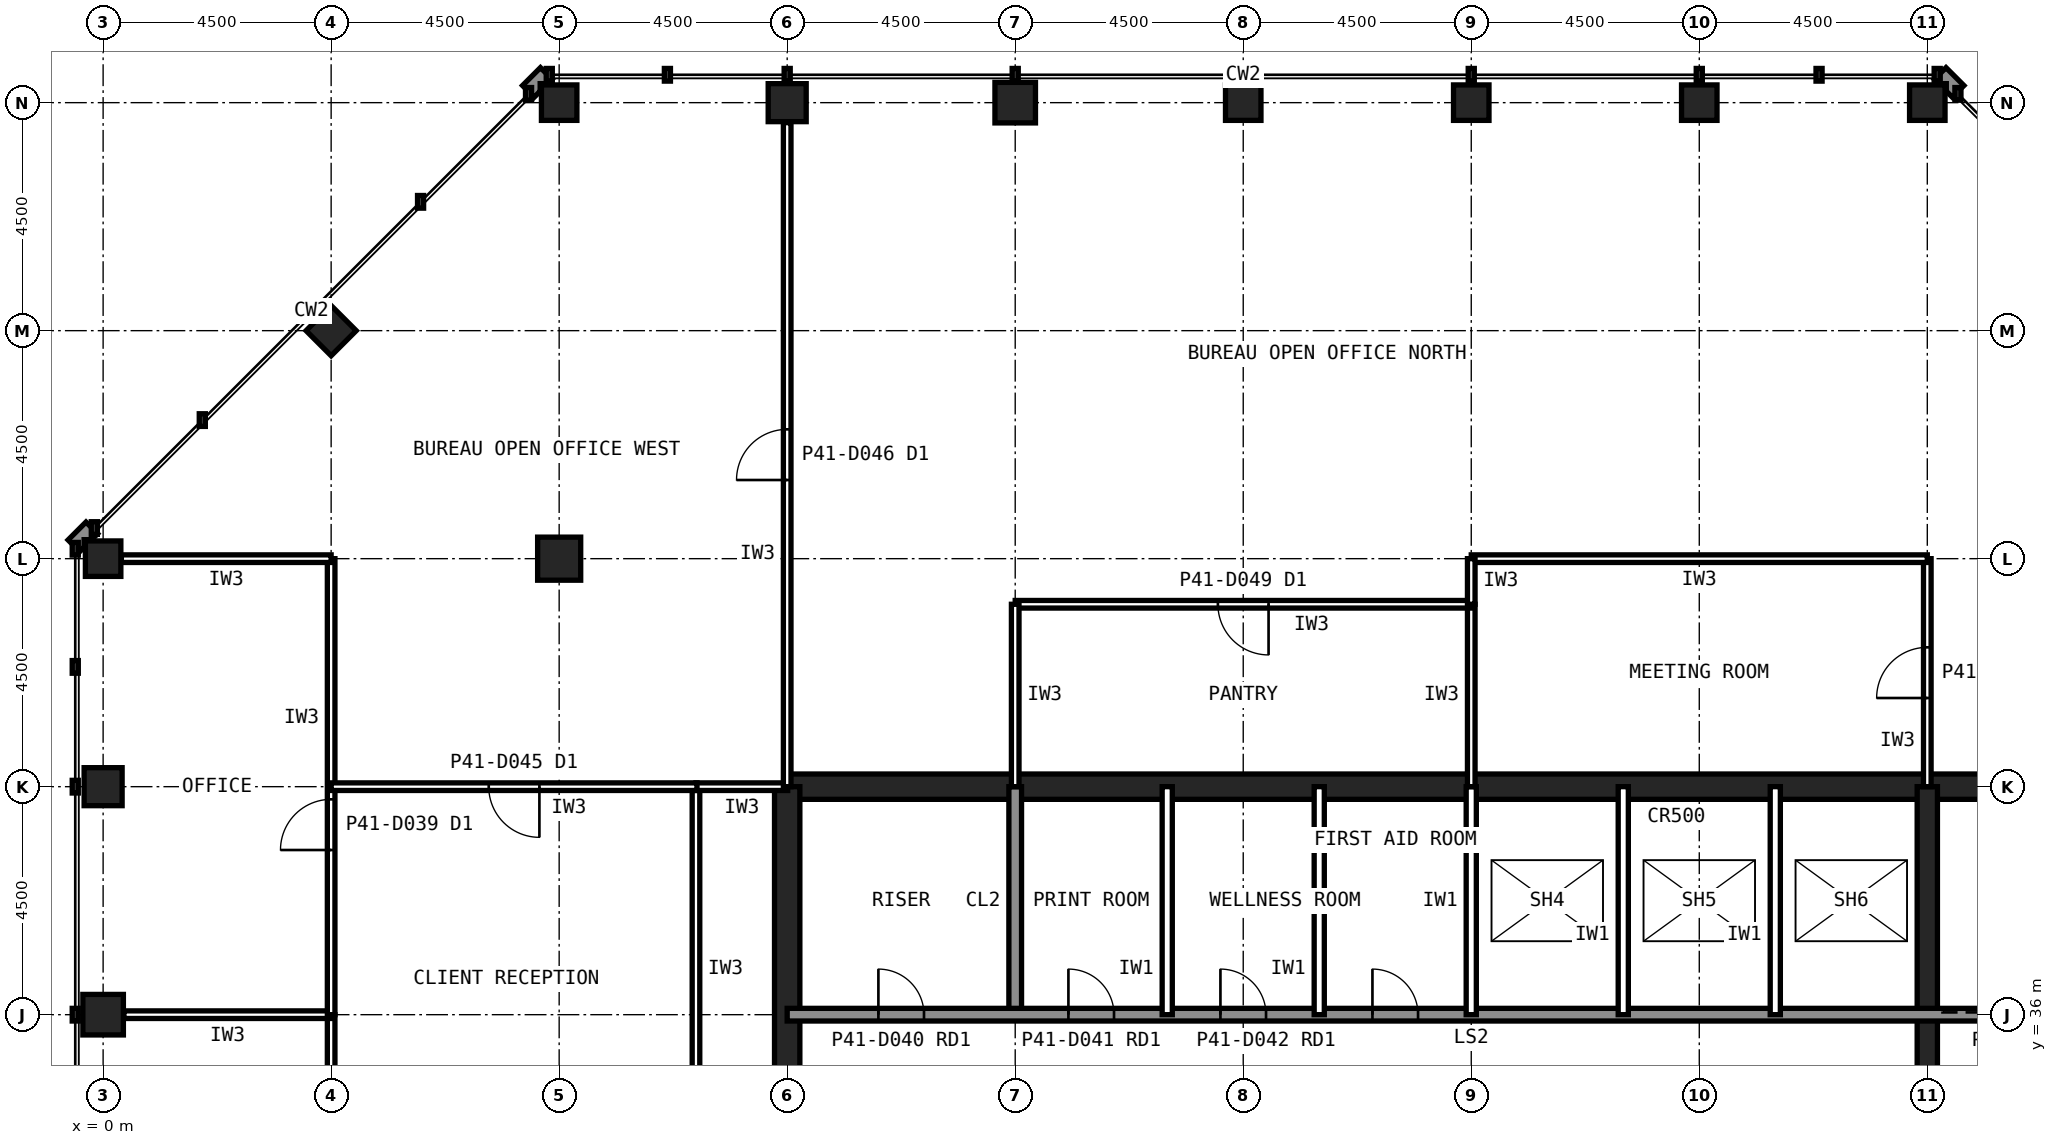
"""IFC4 building model, lengths in metres.
Left out: names, types, materials, properties, quantities, classifications, styles, units other than length and angle.
Written with IfcOpenShell. Run it as: python <this file> out.ifc"""

import sys

from ifc_helpers import new_model, si_unit, direction, frame, frame_2d, origin, origin_2d, place, context, subcontext, project, spatial, rectangle, hollow_rectangle, extrude, element, fill, save


model = new_model("IFC4")
c1 = context("Model", 3, precision=1e-05, world=origin(), true_north=direction((0.0, 1.0)))
c2 = subcontext(c1, "Body", "Model", "MODEL_VIEW")
j1 = project(units=[si_unit("LENGTHUNIT", "METRE"), si_unit("PLANEANGLEUNIT", "RADIAN")], contexts=[c1])
p1 = place(None, origin())
s1 = spatial("IfcSite", under=j1, at=p1, CompositionType="ELEMENT")
p2 = place(p1, origin())
s2 = spatial("IfcBuilding", under=s1, at=p2, CompositionType="ELEMENT")
p3 = place(p2, frame((0.0, 0.0, 175.6)))
s3 = spatial("IfcBuildingStorey", under=s2, at=p3, CompositionType="ELEMENT", Elevation=175.6)
for number, where, z_axis, x_axis in (
    (1, (36.0, 54.0, 0.0), (0.0, 0.0, 1.0), (1.0, 0.0, 0.0)),
    (2, (31.5, 54.0, 0.0), (0.0, 0.0, 1.0), (1.0, 0.0, 0.0)),
    (3, (27.0, 54.0, 0.0), (0.0, 0.0, 1.0), (1.0, 0.0, 0.0)),
    (4, (22.5, 54.0, 0.0), (0.0, 0.0, 1.0), (1.0, 0.0, 0.0)),
):
    element("IfcColumn", number, at=place(p3, frame(where, z_axis=z_axis, x_axis=x_axis)), inside=s3, PredefinedType="COLUMN", context=c2, shape_type="SweptSolid", body=[
        extrude(hollow_rectangle(XDim=0.7, YDim=0.7, WallThickness=0.036, at=origin_2d()), origin(), (0.0, 0.0, 1.0), 4.0),
    ])
p4 = place(p3, frame((18.0, 54.0, 0.0), z_axis=(0.0, 0.0, 1.0), x_axis=(1.0, 0.0, 0.0)))
e5 = element("IfcColumn", 5, at=p4, inside=s3, PredefinedType="COLUMN", context=c2, shape_type="SweptSolid", body=[
    extrude(hollow_rectangle(XDim=0.8, YDim=0.8, WallThickness=0.045, at=origin_2d()), origin(), (0.0, 0.0, 1.0), 4.0),
])
p5 = place(p3, frame((13.5, 54.0, 0.0), z_axis=(0.0, 0.0, 1.0), x_axis=(1.0, 0.0, 0.0)))
e6 = element("IfcColumn", 6, at=p5, inside=s3, PredefinedType="COLUMN", context=c2, shape_type="SweptSolid", body=[
    extrude(hollow_rectangle(XDim=0.75, YDim=0.75, WallThickness=0.04, at=origin_2d()), origin(), (0.0, 0.0, 1.0), 4.0),
])
for number, where, z_axis, x_axis in (
    (7, (9.0, 54.0, 0.0), (0.0, 0.0, 1.0), (1.0, 0.0, 0.0)),
    (8, (0.0, 45.0, 0.0), (0.0, 0.0, 1.0), (1.0, 0.0, 0.0)),
):
    element("IfcColumn", number, at=place(p3, frame(where, z_axis=z_axis, x_axis=x_axis)), inside=s3, PredefinedType="COLUMN", context=c2, shape_type="SweptSolid", body=[
        extrude(hollow_rectangle(XDim=0.7, YDim=0.7, WallThickness=0.036, at=origin_2d()), origin(), (0.0, 0.0, 1.0), 4.0),
    ])
p6 = place(p3, frame((0.0, 40.5, 0.0), z_axis=(0.0, 0.0, 1.0), x_axis=(1.0, 0.0, 0.0)))
e9 = element("IfcColumn", 9, at=p6, inside=s3, PredefinedType="COLUMN", context=c2, shape_type="SweptSolid", body=[
    extrude(hollow_rectangle(XDim=0.75, YDim=0.75, WallThickness=0.04, at=origin_2d()), origin(), (0.0, 0.0, 1.0), 4.0),
])
p7 = place(p3, frame((0.0, 36.0, 0.0), z_axis=(0.0, 0.0, 1.0), x_axis=(1.0, 0.0, 0.0)))
e10 = element("IfcColumn", 10, at=p7, inside=s3, PredefinedType="COLUMN", context=c2, shape_type="SweptSolid", body=[
    extrude(hollow_rectangle(XDim=0.8, YDim=0.8, WallThickness=0.045, at=origin_2d()), origin(), (0.0, 0.0, 1.0), 4.0),
])
p8 = place(p3, frame((4.5, 49.5, 0.0), z_axis=(0.0, 0.0, 1.0), x_axis=(0.707106781187, 0.707106781187, 0.0)))
e11 = element("IfcColumn", 11, at=p8, inside=s3, PredefinedType="COLUMN", context=c2, shape_type="SweptSolid", body=[
    extrude(hollow_rectangle(XDim=0.7, YDim=0.7, WallThickness=0.036, at=origin_2d()), origin(), (0.0, 0.0, 1.0), 4.0),
])
p9 = place(p3, frame((9.0, 45.0, 0.0), z_axis=(0.0, 0.0, 1.0), x_axis=(1.0, 0.0, 0.0)))
e12 = element("IfcColumn", 12, at=p9, inside=s3, PredefinedType="COLUMN", context=c2, shape_type="SweptSolid", body=[
    extrude(hollow_rectangle(XDim=0.85, YDim=0.85, WallThickness=0.05, at=origin_2d()), origin(), (0.0, 0.0, 1.0), 4.0),
])
p10 = place(p3, frame((40.5, 40.5, 0.0), z_axis=(0.0, 0.0, 1.0), x_axis=(-1.0, 0.0, 0.0)))
e13 = element("IfcWall", 13, at=p10, inside=s3, PredefinedType="SHEAR", context=c2, shape_type="SweptSolid", body=[
    extrude(rectangle(XDim=27.0, YDim=0.5, at=frame_2d((13.5, 0.0))), origin(), (0.0, 0.0, 1.0), 4.0),
])
p11 = place(p3, frame((13.5, 40.5, 0.0), z_axis=(0.0, 0.0, 1.0), x_axis=(0.0, -1.0, 0.0)))
e14 = element("IfcWall", 14, at=p11, inside=s3, PredefinedType="SHEAR", context=c2, shape_type="SweptSolid", body=[
    extrude(rectangle(XDim=27.0, YDim=0.5, at=frame_2d((13.5, 0.0))), origin(), (0.0, 0.0, 1.0), 4.0),
])
p12 = place(p11, frame((19.65, 0.0, 0.0)))
e15 = element("IfcOpeningElement", 15, at=p12, cuts=e14, PredefinedType="OPENING", context=c2, shape_type="SweptSolid", body=[
    extrude(rectangle(XDim=1.2, YDim=2.1, at=frame_2d((0.6, 1.05))), frame((0.0, 0.26, 0.0), z_axis=(0.0, -1.0, 0.0), x_axis=(1.0, 0.0, 0.0)), (0.0, 0.0, 1.0), 0.52),
])
p13 = place(p11, frame((5.85, 0.0, 0.0)))
e16 = element("IfcOpeningElement", 16, at=p13, cuts=e14, PredefinedType="OPENING", context=c2, shape_type="SweptSolid", body=[
    extrude(rectangle(XDim=1.8, YDim=2.1, at=frame_2d((0.9, 1.05))), frame((0.0, 0.26, 0.0), z_axis=(0.0, -1.0, 0.0), x_axis=(1.0, 0.0, 0.0)), (0.0, 0.0, 1.0), 0.52),
])
p14 = place(p3, frame((18.0, 36.0, 0.0), z_axis=(0.0, 0.0, 1.0), x_axis=(0.0, 1.0, 0.0)))
e17 = element("IfcWall", 17, at=p14, inside=s3, PredefinedType="SOLIDWALL", context=c2, shape_type="SweptSolid", body=[
    extrude(rectangle(XDim=4.5, YDim=0.25, at=frame_2d((2.25, 0.0))), origin(), (0.0, 0.0, 1.0), 3.84),
])
p15 = place(p3, frame((36.0, 22.5, 0.0), z_axis=(0.0, 0.0, 1.0), x_axis=(0.0, 1.0, 0.0)))
e18 = element("IfcWall", 18, at=p15, inside=s3, PredefinedType="SHEAR", context=c2, shape_type="SweptSolid", body=[
    extrude(rectangle(XDim=18.0, YDim=0.4, at=frame_2d((9.0, 0.0))), origin(), (0.0, 0.0, 1.0), 4.0),
])
p16 = place(p3, frame((13.5, 36.0, 0.0), z_axis=(0.0, 0.0, 1.0), x_axis=(1.0, 0.0, 0.0)))
e19 = element("IfcWall", 19, at=p16, inside=s3, PredefinedType="SOLIDWALL", context=c2, shape_type="SweptSolid", body=[
    extrude(rectangle(XDim=27.0, YDim=0.25, at=frame_2d((13.5, 0.0))), origin(), (0.0, 0.0, 1.0), 3.84),
])
p17 = place(p16, frame((1.8, 0.0, 0.0)))
e20 = element("IfcOpeningElement", 20, at=p17, cuts=e19, PredefinedType="OPENING", context=c2, shape_type="SweptSolid", body=[
    extrude(rectangle(XDim=0.9, YDim=2.1, at=frame_2d((0.45, 1.05))), frame((0.0, 0.135, 0.0), z_axis=(0.0, -1.0, 0.0), x_axis=(1.0, 0.0, 0.0)), (0.0, 0.0, 1.0), 0.27),
])
p18 = place(p16, frame((5.55, 0.0, 0.0)))
e21 = element("IfcOpeningElement", 21, at=p18, cuts=e19, PredefinedType="OPENING", context=c2, shape_type="SweptSolid", body=[
    extrude(rectangle(XDim=0.9, YDim=2.1, at=frame_2d((0.45, 1.05))), frame((0.0, 0.135, 0.0), z_axis=(0.0, -1.0, 0.0), x_axis=(1.0, 0.0, 0.0)), (0.0, 0.0, 1.0), 0.27),
])
p19 = place(p16, frame((8.55, 0.0, 0.0)))
e22 = element("IfcOpeningElement", 22, at=p19, cuts=e19, PredefinedType="OPENING", context=c2, shape_type="SweptSolid", body=[
    extrude(rectangle(XDim=0.9, YDim=2.1, at=frame_2d((0.45, 1.05))), frame((0.0, 0.135, 0.0), z_axis=(0.0, -1.0, 0.0), x_axis=(1.0, 0.0, 0.0)), (0.0, 0.0, 1.0), 0.27),
])
p20 = place(p16, frame((11.55, 0.0, 0.0)))
e23 = element("IfcOpeningElement", 23, at=p20, cuts=e19, PredefinedType="OPENING", context=c2, shape_type="SweptSolid", body=[
    extrude(rectangle(XDim=0.9, YDim=2.1, at=frame_2d((0.45, 1.05))), frame((0.0, 0.135, 0.0), z_axis=(0.0, -1.0, 0.0), x_axis=(1.0, 0.0, 0.0)), (0.0, 0.0, 1.0), 0.27),
])
p21 = place(p16, frame((24.1, 0.0, 0.0)))
e24 = element("IfcOpeningElement", 24, at=p21, cuts=e19, PredefinedType="OPENING", context=c2, shape_type="SweptSolid", body=[
    extrude(rectangle(XDim=1.3, YDim=2.2, at=frame_2d((0.65, 1.1))), frame((0.0, 0.135, 0.0), z_axis=(0.0, -1.0, 0.0), x_axis=(1.0, 0.0, 0.0)), (0.0, 0.0, 1.0), 0.27),
])
for number, where, z_axis, x_axis in (
    (25, (21.0, 36.0, 0.0), (0.0, 0.0, 1.0), (0.0, 1.0, 0.0)),
    (26, (24.0, 36.0, 0.0), (0.0, 0.0, 1.0), (0.0, 1.0, 0.0)),
    (27, (27.0, 36.0, 0.0), (0.0, 0.0, 1.0), (0.0, 1.0, 0.0)),
    (28, (30.0, 36.0, 0.0), (0.0, 0.0, 1.0), (0.0, 1.0, 0.0)),
    (29, (33.0, 36.0, 0.0), (0.0, 0.0, 1.0), (0.0, 1.0, 0.0)),
):
    element("IfcWall", number, at=place(p3, frame(where, z_axis=z_axis, x_axis=x_axis)), inside=s3, PredefinedType="PARTITIONING", context=c2, shape_type="SweptSolid", body=[
        extrude(rectangle(XDim=4.5, YDim=0.2, at=frame_2d((2.25, 0.0))), origin(), (0.0, 0.0, 1.0), 3.84),
    ])
p22 = place(p3, frame((11.7, 40.5, 0.0), z_axis=(0.0, 0.0, 1.0), x_axis=(0.0, -1.0, 0.0)))
e30 = element("IfcWall", 30, at=p22, inside=s3, PredefinedType="PARTITIONING", context=c2, shape_type="SweptSolid", body=[
    extrude(rectangle(XDim=7.2, YDim=0.15, at=frame_2d((3.6, 0.0))), origin(), (0.0, 0.0, 1.0), 3.84),
])
p23 = place(p3, frame((13.51, 40.5, 0.0), z_axis=(0.0, 0.0, 1.0), x_axis=(-1.0, 0.0, 0.0)))
e31 = element("IfcWall", 31, at=p23, inside=s3, PredefinedType="PARTITIONING", context=c2, shape_type="SweptSolid", body=[
    extrude(rectangle(XDim=1.81, YDim=0.15, at=frame_2d((0.905, 0.0))), origin(), (0.0, 0.0, 1.0), 2.989),
])
p24 = place(p3, frame((4.5, 27.0, 0.0), z_axis=(0.0, 0.0, 1.0), x_axis=(0.0, 1.0, 0.0)))
e32 = element("IfcWall", 32, at=p24, inside=s3, PredefinedType="PARTITIONING", context=c2, shape_type="SweptSolid", body=[
    extrude(rectangle(XDim=9.0, YDim=0.15, at=frame_2d((4.5, 0.0))), origin(), (0.0, 0.0, 1.0), 3.84),
])
p25 = place(p24, frame((4.0, 0.0, 0.0)))
e33 = element("IfcOpeningElement", 33, at=p25, cuts=e32, PredefinedType="OPENING", context=c2, shape_type="SweptSolid", body=[
    extrude(rectangle(XDim=1.0, YDim=2.1, at=frame_2d((0.5, 1.05))), frame((0.0, 0.085, 0.0), z_axis=(0.0, -1.0, 0.0), x_axis=(1.0, 0.0, 0.0)), (0.0, 0.0, 1.0), 0.17),
])
p26 = place(p3, frame((4.5, 36.0, 0.0), z_axis=(0.0, 0.0, 1.0), x_axis=(-1.0, 0.0, 0.0)))
e34 = element("IfcWall", 34, at=p26, inside=s3, PredefinedType="PARTITIONING", context=c2, shape_type="SweptSolid", body=[
    extrude(rectangle(XDim=4.09, YDim=0.15, at=frame_2d((2.045, 0.0))), origin(), (0.0, 0.0, 1.0), 2.989),
])
p27 = place(p3, frame((4.5, 36.0, 0.0), z_axis=(0.0, 0.0, 1.0), x_axis=(0.0, 1.0, 0.0)))
e35 = element("IfcWall", 35, at=p27, inside=s3, PredefinedType="PARTITIONING", context=c2, shape_type="SweptSolid", body=[
    extrude(rectangle(XDim=9.0, YDim=0.15, at=frame_2d((4.5, 0.0))), origin(), (0.0, 0.0, 1.0), 3.84),
])
p28 = place(p27, frame((3.25, 0.0, 0.0)))
e36 = element("IfcOpeningElement", 36, at=p28, cuts=e35, PredefinedType="OPENING", context=c2, shape_type="SweptSolid", body=[
    extrude(rectangle(XDim=1.0, YDim=2.1, at=frame_2d((0.5, 1.05))), frame((0.0, 0.085, 0.0), z_axis=(0.0, -1.0, 0.0), x_axis=(1.0, 0.0, 0.0)), (0.0, 0.0, 1.0), 0.17),
])
p29 = place(p3, frame((4.5, 45.0, 0.0), z_axis=(0.0, 0.0, 1.0), x_axis=(-1.0, 0.0, 0.0)))
e37 = element("IfcWall", 37, at=p29, inside=s3, PredefinedType="PARTITIONING", context=c2, shape_type="SweptSolid", body=[
    extrude(rectangle(XDim=4.14, YDim=0.15, at=frame_2d((2.07, 0.0))), origin(), (0.0, 0.0, 1.0), 3.229),
])
p30 = place(p3, frame((27.0, 40.5, 0.0), z_axis=(0.0, 0.0, 1.0), x_axis=(0.0, 1.0, 0.0)))
e38 = element("IfcWall", 38, at=p30, inside=s3, PredefinedType="PARTITIONING", context=c2, shape_type="SweptSolid", body=[
    extrude(rectangle(XDim=3.6, YDim=0.15, at=frame_2d((1.8, 0.0))), origin(), (0.0, 0.0, 1.0), 2.989),
])
p31 = place(p3, frame((27.0, 44.1, 0.0), z_axis=(0.0, 0.0, 1.0), x_axis=(-1.0, 0.0, 0.0)))
e39 = element("IfcWall", 39, at=p31, inside=s3, PredefinedType="PARTITIONING", context=c2, shape_type="SweptSolid", body=[
    extrude(rectangle(XDim=9.0, YDim=0.15, at=frame_2d((4.5, 0.0))), origin(), (0.0, 0.0, 1.0), 3.84),
])
p32 = place(p31, frame((4.0, 0.0, 0.0)))
e40 = element("IfcOpeningElement", 40, at=p32, cuts=e39, PredefinedType="OPENING", context=c2, shape_type="SweptSolid", body=[
    extrude(rectangle(XDim=1.0, YDim=2.1, at=frame_2d((0.5, 1.05))), frame((0.0, 0.085, 0.0), z_axis=(0.0, -1.0, 0.0), x_axis=(1.0, 0.0, 0.0)), (0.0, 0.0, 1.0), 0.17),
])
p33 = place(p3, frame((18.0, 44.1, 0.0), z_axis=(0.0, 0.0, 1.0), x_axis=(0.0, -1.0, 0.0)))
e41 = element("IfcWall", 41, at=p33, inside=s3, PredefinedType="PARTITIONING", context=c2, shape_type="SweptSolid", body=[
    extrude(rectangle(XDim=3.6, YDim=0.15, at=frame_2d((1.8, 0.0))), origin(), (0.0, 0.0, 1.0), 2.989),
])
p34 = place(p3, frame((36.0, 40.5, 0.0), z_axis=(0.0, 0.0, 1.0), x_axis=(0.0, 1.0, 0.0)))
e42 = element("IfcWall", 42, at=p34, inside=s3, PredefinedType="PARTITIONING", context=c2, shape_type="SweptSolid", body=[
    extrude(rectangle(XDim=4.5, YDim=0.15, at=frame_2d((2.25, 0.0))), origin(), (0.0, 0.0, 1.0), 2.989),
])
p35 = place(p34, frame((1.75, 0.0, 0.0)))
e43 = element("IfcOpeningElement", 43, at=p35, cuts=e42, PredefinedType="OPENING", context=c2, shape_type="SweptSolid", body=[
    extrude(rectangle(XDim=1.0, YDim=2.1, at=frame_2d((0.5, 1.05))), frame((0.0, 0.085, 0.0), z_axis=(0.0, -1.0, 0.0), x_axis=(1.0, 0.0, 0.0)), (0.0, 0.0, 1.0), 0.17),
])
p36 = place(p3, frame((36.0, 45.0, 0.0), z_axis=(0.0, 0.0, 1.0), x_axis=(-1.0, 0.0, 0.0)))
e44 = element("IfcWall", 44, at=p36, inside=s3, PredefinedType="PARTITIONING", context=c2, shape_type="SweptSolid", body=[
    extrude(rectangle(XDim=9.0, YDim=0.15, at=frame_2d((4.5, 0.0))), origin(), (0.0, 0.0, 1.0), 3.84),
])
p37 = place(p3, frame((27.0, 45.0, 0.0), z_axis=(0.0, 0.0, 1.0), x_axis=(0.0, -1.0, 0.0)))
e45 = element("IfcWall", 45, at=p37, inside=s3, PredefinedType="PARTITIONING", context=c2, shape_type="SweptSolid", body=[
    extrude(rectangle(XDim=0.9, YDim=0.15, at=frame_2d((0.45, 0.0))), origin(), (0.0, 0.0, 1.0), 2.989),
])
p38 = place(p3, frame((13.5, 40.5, 0.0), z_axis=(0.0, 0.0, 1.0), x_axis=(0.0, 1.0, 0.0)))
e46 = element("IfcWall", 46, at=p38, inside=s3, PredefinedType="PARTITIONING", context=c2, shape_type="SweptSolid", body=[
    extrude(rectangle(XDim=13.105, YDim=0.15, at=frame_2d((6.552, 0.0))), origin(), (0.0, 0.0, 1.0), 2.989),
])
p39 = place(p38, frame((6.052, 0.0, 0.0)))
e47 = element("IfcOpeningElement", 47, at=p39, cuts=e46, PredefinedType="OPENING", context=c2, shape_type="SweptSolid", body=[
    extrude(rectangle(XDim=1.0, YDim=2.1, at=frame_2d((0.5, 1.05))), frame((0.0, 0.085, 0.0), z_axis=(0.0, -1.0, 0.0), x_axis=(1.0, 0.0, 0.0)), (0.0, 0.0, 1.0), 0.17),
])
p40 = place(p3, frame((11.72, 40.5, 0.0), z_axis=(0.0, 0.0, 1.0), x_axis=(-1.0, 0.0, 0.0)))
e48 = element("IfcWall", 48, at=p40, inside=s3, PredefinedType="PARTITIONING", context=c2, shape_type="SweptSolid", body=[
    extrude(rectangle(XDim=7.22, YDim=0.15, at=frame_2d((3.61, 0.0))), origin(), (0.0, 0.0, 1.0), 2.989),
])
p41 = place(p40, frame((3.11, 0.0, 0.0)))
e49 = element("IfcOpeningElement", 49, at=p41, cuts=e48, PredefinedType="OPENING", context=c2, shape_type="SweptSolid", body=[
    extrude(rectangle(XDim=1.0, YDim=2.1, at=frame_2d((0.5, 1.05))), frame((0.0, 0.085, 0.0), z_axis=(0.0, -1.0, 0.0), x_axis=(1.0, 0.0, 0.0)), (0.0, 0.0, 1.0), 0.17),
])
p42 = place(p17, origin())
e50 = element("IfcDoor", 50, at=p42, inside=s3, OperationType="SINGLE_SWING_LEFT", PredefinedType="DOOR", context=c2, shape_type="SweptSolid", body=[
    extrude(rectangle(XDim=0.9, YDim=2.1, at=frame_2d((0.45, 1.05))), frame((0.0, 0.025, 0.0), z_axis=(0.0, -1.0, 0.0), x_axis=(1.0, 0.0, 0.0)), (0.0, 0.0, 1.0), 0.05),
])
fill(e20, e50)
p43 = place(p18, origin())
e51 = element("IfcDoor", 51, at=p43, inside=s3, OperationType="SINGLE_SWING_LEFT", PredefinedType="DOOR", context=c2, shape_type="SweptSolid", body=[
    extrude(rectangle(XDim=0.9, YDim=2.1, at=frame_2d((0.45, 1.05))), frame((0.0, 0.025, 0.0), z_axis=(0.0, -1.0, 0.0), x_axis=(1.0, 0.0, 0.0)), (0.0, 0.0, 1.0), 0.05),
])
fill(e21, e51)
p44 = place(p19, origin())
e52 = element("IfcDoor", 52, at=p44, inside=s3, OperationType="SINGLE_SWING_LEFT", PredefinedType="DOOR", context=c2, shape_type="SweptSolid", body=[
    extrude(rectangle(XDim=0.9, YDim=2.1, at=frame_2d((0.45, 1.05))), frame((0.0, 0.025, 0.0), z_axis=(0.0, -1.0, 0.0), x_axis=(1.0, 0.0, 0.0)), (0.0, 0.0, 1.0), 0.05),
])
fill(e22, e52)
p45 = place(p20, origin())
e53 = element("IfcDoor", 53, at=p45, inside=s3, OperationType="SINGLE_SWING_LEFT", PredefinedType="DOOR", context=c2, shape_type="SweptSolid", body=[
    extrude(rectangle(XDim=0.9, YDim=2.1, at=frame_2d((0.45, 1.05))), frame((0.0, 0.025, 0.0), z_axis=(0.0, -1.0, 0.0), x_axis=(1.0, 0.0, 0.0)), (0.0, 0.0, 1.0), 0.05),
])
fill(e23, e53)
p46 = place(p28, origin())
e54 = element("IfcDoor", 54, at=p46, inside=s3, OperationType="SINGLE_SWING_LEFT", PredefinedType="DOOR", context=c2, shape_type="SweptSolid", body=[
    extrude(rectangle(XDim=1.0, YDim=2.1, at=frame_2d((0.5, 1.05))), frame((0.0, 0.025, 0.0), z_axis=(0.0, -1.0, 0.0), x_axis=(1.0, 0.0, 0.0)), (0.0, 0.0, 1.0), 0.05),
])
fill(e36, e54)
p47 = place(p32, origin())
e55 = element("IfcDoor", 55, at=p47, inside=s3, OperationType="SINGLE_SWING_LEFT", PredefinedType="DOOR", context=c2, shape_type="SweptSolid", body=[
    extrude(rectangle(XDim=1.0, YDim=2.1, at=frame_2d((0.5, 1.05))), frame((0.0, 0.025, 0.0), z_axis=(0.0, -1.0, 0.0), x_axis=(1.0, 0.0, 0.0)), (0.0, 0.0, 1.0), 0.05),
])
fill(e40, e55)
p48 = place(p35, origin())
e56 = element("IfcDoor", 56, at=p48, inside=s3, OperationType="SINGLE_SWING_LEFT", PredefinedType="DOOR", context=c2, shape_type="SweptSolid", body=[
    extrude(rectangle(XDim=1.0, YDim=2.1, at=frame_2d((0.5, 1.05))), frame((0.0, 0.025, 0.0), z_axis=(0.0, -1.0, 0.0), x_axis=(1.0, 0.0, 0.0)), (0.0, 0.0, 1.0), 0.05),
])
fill(e43, e56)
p49 = place(p39, origin())
e57 = element("IfcDoor", 57, at=p49, inside=s3, OperationType="SINGLE_SWING_LEFT", PredefinedType="DOOR", context=c2, shape_type="SweptSolid", body=[
    extrude(rectangle(XDim=1.0, YDim=2.1, at=frame_2d((0.5, 1.05))), frame((0.0, 0.025, 0.0), z_axis=(0.0, -1.0, 0.0), x_axis=(1.0, 0.0, 0.0)), (0.0, 0.0, 1.0), 0.05),
])
fill(e47, e57)
p50 = place(p41, origin())
e58 = element("IfcDoor", 58, at=p50, inside=s3, OperationType="SINGLE_SWING_LEFT", PredefinedType="DOOR", context=c2, shape_type="SweptSolid", body=[
    extrude(rectangle(XDim=1.0, YDim=2.1, at=frame_2d((0.5, 1.05))), frame((0.0, 0.025, 0.0), z_axis=(0.0, -1.0, 0.0), x_axis=(1.0, 0.0, 0.0)), (0.0, 0.0, 1.0), 0.05),
])
fill(e49, e58)
save(model, sys.argv[1])
